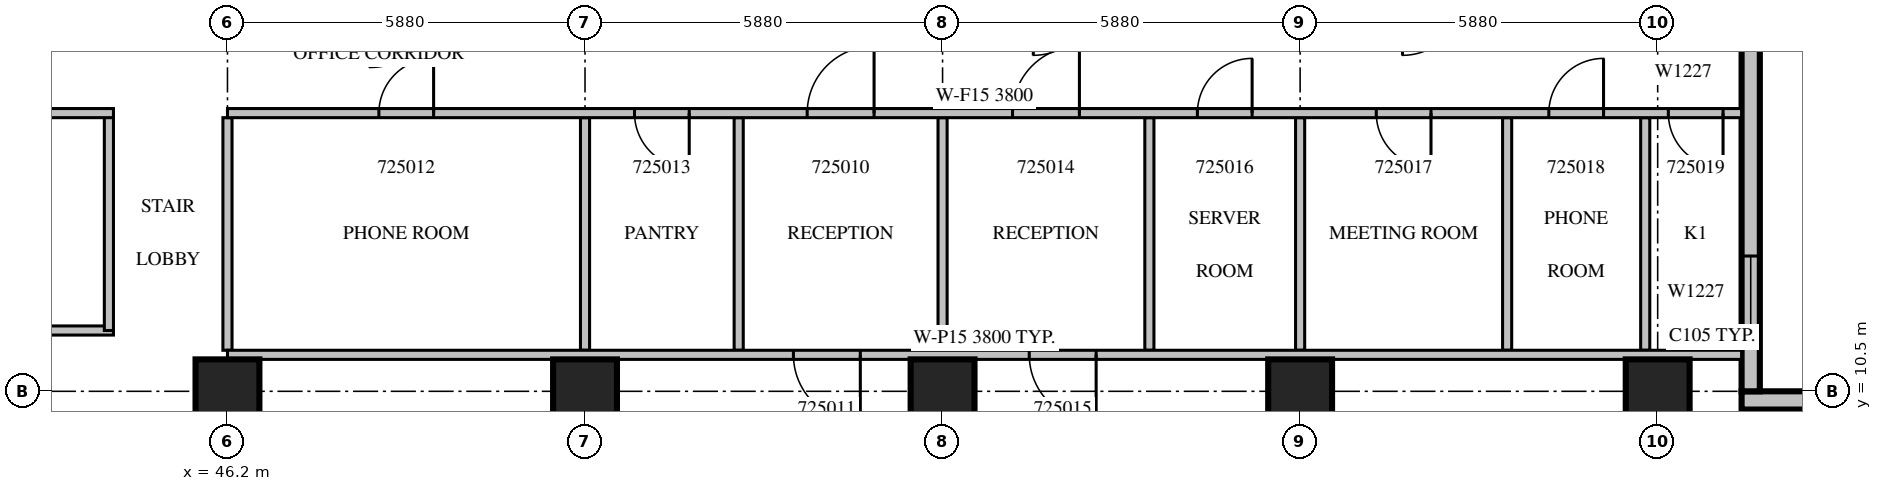
"""IFC4 building model, lengths in metres.
Left out: names, types, materials, properties, quantities, classifications, styles, units other than length and angle.
Written with IfcOpenShell. Run it as: python <this file> out.ifc"""

import sys

from ifc_helpers import new_model, si_unit, direction, frame, frame_2d, origin, origin_2d, place, context, subcontext, project, spatial, rectangle, extrude, source, transform, mapped, element, fill, save


model = new_model("IFC4")
c1 = context("Model", 3, precision=1e-05, world=origin(), true_north=direction((0.0, 1.0)))
c2 = subcontext(c1, "Body", "Model", "MODEL_VIEW")
j1 = project(units=[si_unit("LENGTHUNIT", "METRE"), si_unit("PLANEANGLEUNIT", "RADIAN")], contexts=[c1])
p1 = place(None, origin())
s1 = spatial("IfcSite", under=j1, at=p1, CompositionType="ELEMENT")
p2 = place(p1, origin())
s2 = spatial("IfcBuilding", under=s1, at=p2, CompositionType="ELEMENT")
p3 = place(p2, frame((0.0, 0.0, 116.1)))
s3 = spatial("IfcBuildingStorey", under=s2, at=p3, CompositionType="ELEMENT", Elevation=116.1)
m1 = source(origin(), c2, "Body", "SweptSolid", [
    extrude(rectangle(XDim=1.05, YDim=1.05, at=origin_2d()), origin(), (0.0, 0.0, 1.0), 4.2),
])
for number, where, z_axis, x_axis in (
    (1, (46.2, 10.5, 0.0), (0.0, 0.0, 1.0), (1.0, 0.0, 0.0)),
    (2, (52.08, 10.5, 0.0), (0.0, 0.0, 1.0), (1.0, 0.0, 0.0)),
    (3, (57.96, 10.5, 0.0), (0.0, 0.0, 1.0), (1.0, 0.0, 0.0)),
    (4, (63.84, 10.5, 0.0), (0.0, 0.0, 1.0), (1.0, 0.0, 0.0)),
    (5, (69.72, 10.5, 0.0), (0.0, 0.0, 1.0), (1.0, 0.0, 0.0)),
):
    element("IfcColumn", number, at=place(p3, frame(where, z_axis=z_axis, x_axis=x_axis)), inside=s3, PredefinedType="COLUMN", context=c2, shape_type="MappedRepresentation", body=[
        mapped(m1, transform((0.0, 0.0, 0.0), scale=1.0)),
    ])
m2 = source(origin(), c2, "Body", "SweptSolid", [
    extrude(rectangle(XDim=1.2, YDim=0.3, at=frame_2d((0.6, 0.0))), origin(), (0.0, 0.0, 1.0), 3.8),
])
p4 = place(p3, frame((71.1, 10.35, 0.0), z_axis=(0.0, 0.0, 1.0), x_axis=(1.0, 0.0, 0.0)))
e6 = element("IfcWall", 6, at=p4, inside=s3, PredefinedType="STANDARD", context=c2, shape_type="MappedRepresentation", body=[
    mapped(m2, transform((0.0, 0.0, 0.0), scale=1.0)),
])
m3 = source(origin(), c2, "Body", "SweptSolid", [
    extrude(rectangle(XDim=6.3, YDim=0.3, at=frame_2d((3.15, 0.0))), origin(), (0.0, 0.0, 1.0), 3.8),
])
p5 = place(p3, frame((71.25, 10.5, 0.0), z_axis=(0.0, 0.0, 1.0), x_axis=(0.0, 1.0, 0.0)))
e7 = element("IfcWall", 7, at=p5, inside=s3, PredefinedType="STANDARD", context=c2, shape_type="MappedRepresentation", body=[
    mapped(m3, transform((0.0, 0.0, 0.0), scale=1.0)),
])
m4 = source(origin(), c2, "Body", "SweptSolid", [
    extrude(rectangle(XDim=1.2, YDim=2.7, at=frame_2d((0.6, 1.35))), frame((0.0, 0.16, 0.0), z_axis=(0.0, -1.0, 0.0), x_axis=(1.0, 0.0, 0.0)), (0.0, 0.0, 1.0), 0.32),
])
p6 = place(p5, frame((1.025, 0.0, 0.6)))
e8 = element("IfcOpeningElement", 8, at=p6, cuts=e7, PredefinedType="OPENING", context=c2, shape_type="MappedRepresentation", body=[
    mapped(m4, transform((0.0, 0.0, 0.0), scale=1.0)),
])
m5 = source(origin(), c2, "Body", "SweptSolid", [
    extrude(rectangle(XDim=6.45, YDim=0.15, at=frame_2d((3.225, 0.0))), origin(), (0.0, 0.0, 1.0), 3.3),
])
p7 = place(p3, frame((37.875, 11.5, 0.0), z_axis=(0.0, 0.0, 1.0), x_axis=(1.0, 0.0, 0.0)))
e9 = element("IfcWall", 9, at=p7, inside=s3, PredefinedType="PARTITIONING", context=c2, shape_type="MappedRepresentation", body=[
    mapped(m5, transform((0.0, 0.0, 0.0), scale=1.0)),
])
m6 = source(origin(), c2, "Body", "SweptSolid", [
    extrude(rectangle(XDim=3.575, YDim=0.15, at=frame_2d((1.788, 0.0))), origin(), (0.0, 0.0, 1.0), 3.8),
])
p8 = place(p3, frame((44.25, 11.5, 0.0), z_axis=(0.0, 0.0, 1.0), x_axis=(0.0, 1.0, 0.0)))
e10 = element("IfcWall", 10, at=p8, inside=s3, PredefinedType="PARTITIONING", context=c2, shape_type="MappedRepresentation", body=[
    mapped(m6, transform((0.0, 0.0, 0.0), scale=1.0)),
])
p9 = place(p3, frame((44.325, 15.075, 0.0), z_axis=(0.0, 0.0, 1.0), x_axis=(-1.0, 0.0, 0.0)))
e11 = element("IfcWall", 11, at=p9, inside=s3, PredefinedType="PARTITIONING", context=c2, shape_type="MappedRepresentation", body=[
    mapped(m5, transform((0.0, 0.0, 0.0), scale=1.0)),
])
m7 = source(origin(), c2, "Body", "SweptSolid", [
    extrude(rectangle(XDim=0.9, YDim=2.1, at=frame_2d((0.45, 1.05))), frame((0.0, 0.085, 0.0), z_axis=(0.0, -1.0, 0.0), x_axis=(1.0, 0.0, 0.0)), (0.0, 0.0, 1.0), 0.17),
])
p10 = place(p9, frame((2.812, 0.0, 0.0)))
e12 = element("IfcOpeningElement", 12, at=p10, cuts=e11, PredefinedType="OPENING", context=c2, shape_type="MappedRepresentation", body=[
    mapped(m7, transform((0.0, 0.0, 0.0), scale=1.0)),
])
m8 = source(origin(), c2, "Body", "SweptSolid", [
    extrude(rectangle(XDim=3.825, YDim=0.15, at=frame_2d((1.913, 0.0))), origin(), (0.0, 0.0, 1.0), 3.8),
])
for number, where, z_axis, x_axis in (
    (13, (52.08, 11.175, 0.0), (0.0, 0.0, 1.0), (0.0, 1.0, 0.0)),
    (14, (54.607, 11.175, 0.0), (0.0, 0.0, 1.0), (0.0, 1.0, 0.0)),
    (15, (61.361, 11.175, 0.0), (0.0, 0.0, 1.0), (0.0, 1.0, 0.0)),
    (16, (63.84, 11.175, 0.0), (0.0, 0.0, 1.0), (0.0, 1.0, 0.0)),
    (17, (67.244, 11.175, 0.0), (0.0, 0.0, 1.0), (0.0, 1.0, 0.0)),
    (18, (69.515, 11.175, 0.0), (0.0, 0.0, 1.0), (0.0, 1.0, 0.0)),
    (19, (46.2, 11.175, 0.0), (0.0, 0.0, 1.0), (0.0, 1.0, 0.0)),
    (20, (57.96, 11.175, 0.0), (0.0, 0.0, 1.0), (0.0, 1.0, 0.0)),
):
    element("IfcWall", number, at=place(p3, frame(where, z_axis=z_axis, x_axis=x_axis)), inside=s3, PredefinedType="PARTITIONING", context=c2, shape_type="MappedRepresentation", body=[
        mapped(m8, transform((0.0, 0.0, 0.0), scale=1.0)),
    ])
m9 = source(origin(), c2, "Body", "SweptSolid", [
    extrude(rectangle(XDim=24.9, YDim=0.15, at=frame_2d((12.45, 0.0))), origin(), (0.0, 0.0, 1.0), 3.8),
])
p11 = place(p3, frame((71.1, 11.1, 0.0), z_axis=(0.0, 0.0, 1.0), x_axis=(-1.0, 0.0, 0.0)))
e21 = element("IfcWall", 21, at=p11, inside=s3, PredefinedType="PARTITIONING", context=c2, shape_type="MappedRepresentation", body=[
    mapped(m9, transform((0.0, 0.0, 0.0), scale=1.0)),
])
m10 = source(origin(), c2, "Body", "SweptSolid", [
    extrude(rectangle(XDim=1.1, YDim=2.1, at=frame_2d((0.55, 1.05))), frame((0.0, 0.085, 0.0), z_axis=(0.0, -1.0, 0.0), x_axis=(1.0, 0.0, 0.0)), (0.0, 0.0, 1.0), 0.17),
])
p12 = place(p11, frame((14.493, 0.0, 0.0)))
e22 = element("IfcOpeningElement", 22, at=p12, cuts=e21, PredefinedType="OPENING", context=c2, shape_type="MappedRepresentation", body=[
    mapped(m10, transform((0.0, 0.0, 0.0), scale=1.0)),
])
p13 = place(p11, frame((10.614, 0.0, 0.0)))
e23 = element("IfcOpeningElement", 23, at=p13, cuts=e21, PredefinedType="OPENING", context=c2, shape_type="MappedRepresentation", body=[
    mapped(m10, transform((0.0, 0.0, 0.0), scale=1.0)),
])
p14 = place(p3, frame((71.1, 15.075, 0.0), z_axis=(0.0, 0.0, 1.0), x_axis=(-1.0, 0.0, 0.0)))
e24 = element("IfcWall", 24, at=p14, inside=s3, PredefinedType="PARTITIONING", context=c2, shape_type="MappedRepresentation", body=[
    mapped(m9, transform((0.0, 0.0, 0.0), scale=1.0)),
])
p15 = place(p14, frame((14.266, 0.0, 0.0)))
e25 = element("IfcOpeningElement", 25, at=p15, cuts=e24, PredefinedType="OPENING", context=c2, shape_type="MappedRepresentation", body=[
    mapped(m10, transform((0.0, 0.0, 0.0), scale=1.0)),
])
p16 = place(p14, frame((21.51, 0.0, 0.0)))
e26 = element("IfcOpeningElement", 26, at=p16, cuts=e24, PredefinedType="OPENING", context=c2, shape_type="MappedRepresentation", body=[
    mapped(m7, transform((0.0, 0.0, 0.0), scale=1.0)),
])
p17 = place(p14, frame((17.306, 0.0, 0.0)))
e27 = element("IfcOpeningElement", 27, at=p17, cuts=e24, PredefinedType="OPENING", context=c2, shape_type="MappedRepresentation", body=[
    mapped(m7, transform((0.0, 0.0, 0.0), scale=1.0)),
])
p18 = place(p14, frame((10.889, 0.0, 0.0)))
e28 = element("IfcOpeningElement", 28, at=p18, cuts=e24, PredefinedType="OPENING", context=c2, shape_type="MappedRepresentation", body=[
    mapped(m10, transform((0.0, 0.0, 0.0), scale=1.0)),
])
p19 = place(p14, frame((8.05, 0.0, 0.0)))
e29 = element("IfcOpeningElement", 29, at=p19, cuts=e24, PredefinedType="OPENING", context=c2, shape_type="MappedRepresentation", body=[
    mapped(m7, transform((0.0, 0.0, 0.0), scale=1.0)),
])
p20 = place(p14, frame((5.108, 0.0, 0.0)))
e30 = element("IfcOpeningElement", 30, at=p20, cuts=e24, PredefinedType="OPENING", context=c2, shape_type="MappedRepresentation", body=[
    mapped(m7, transform((0.0, 0.0, 0.0), scale=1.0)),
])
p21 = place(p14, frame((2.27, 0.0, 0.0)))
e31 = element("IfcOpeningElement", 31, at=p21, cuts=e24, PredefinedType="OPENING", context=c2, shape_type="MappedRepresentation", body=[
    mapped(m7, transform((0.0, 0.0, 0.0), scale=1.0)),
])
p22 = place(p14, frame((0.305, 0.0, 0.0)))
e32 = element("IfcOpeningElement", 32, at=p22, cuts=e24, PredefinedType="OPENING", context=c2, shape_type="MappedRepresentation", body=[
    mapped(m7, transform((0.0, 0.0, 0.0), scale=1.0)),
])
m11 = source(origin(), c2, "Body", "SweptSolid", [
    extrude(rectangle(XDim=1.2, YDim=2.7, at=frame_2d((0.6, 1.35))), frame((0.0, 0.03, 0.0), z_axis=(0.0, -1.0, 0.0), x_axis=(1.0, 0.0, 0.0)), (0.0, 0.0, 1.0), 0.06),
])
p23 = place(p6, origin())
e33 = element("IfcWindow", 33, at=p23, inside=s3, PartitioningType="SINGLE_PANEL", PredefinedType="WINDOW", context=c2, shape_type="MappedRepresentation", body=[
    mapped(m11, transform((0.0, 0.0, 0.0), scale=1.0)),
])
fill(e8, e33)
m12 = source(origin(), c2, "Body", "SweptSolid", [
    extrude(rectangle(XDim=1.1, YDim=2.1, at=frame_2d((0.55, 1.05))), frame((0.0, 0.025, 0.0), z_axis=(0.0, -1.0, 0.0), x_axis=(1.0, 0.0, 0.0)), (0.0, 0.0, 1.0), 0.05),
])
p24 = place(p15, origin())
e34 = element("IfcDoor", 34, at=p24, inside=s3, OperationType="SINGLE_SWING_RIGHT", PredefinedType="DOOR", context=c2, shape_type="MappedRepresentation", body=[
    mapped(m12, transform((0.0, 0.0, 0.0), scale=1.0)),
])
fill(e25, e34)
p25 = place(p12, origin())
e35 = element("IfcDoor", 35, at=p25, inside=s3, OperationType="SINGLE_SWING_LEFT", PredefinedType="DOOR", context=c2, shape_type="MappedRepresentation", body=[
    mapped(m12, transform((0.0, 0.0, 0.0), scale=1.0)),
])
fill(e22, e35)
m13 = source(origin(), c2, "Body", "SweptSolid", [
    extrude(rectangle(XDim=0.9, YDim=2.1, at=frame_2d((0.45, 1.05))), frame((0.0, 0.025, 0.0), z_axis=(0.0, -1.0, 0.0), x_axis=(1.0, 0.0, 0.0)), (0.0, 0.0, 1.0), 0.05),
])
p26 = place(p16, origin())
e36 = element("IfcDoor", 36, at=p26, inside=s3, OperationType="SINGLE_SWING_RIGHT", PredefinedType="DOOR", context=c2, shape_type="MappedRepresentation", body=[
    mapped(m13, transform((0.0, 0.0, 0.0), scale=1.0)),
])
fill(e26, e36)
p27 = place(p17, origin())
e37 = element("IfcDoor", 37, at=p27, inside=s3, OperationType="SINGLE_SWING_LEFT", PredefinedType="DOOR", context=c2, shape_type="MappedRepresentation", body=[
    mapped(m13, transform((0.0, 0.0, 0.0), scale=1.0)),
])
fill(e27, e37)
p28 = place(p18, origin())
e38 = element("IfcDoor", 38, at=p28, inside=s3, OperationType="SINGLE_SWING_RIGHT", PredefinedType="DOOR", context=c2, shape_type="MappedRepresentation", body=[
    mapped(m12, transform((0.0, 0.0, 0.0), scale=1.0)),
])
fill(e28, e38)
p29 = place(p13, origin())
e39 = element("IfcDoor", 39, at=p29, inside=s3, OperationType="SINGLE_SWING_LEFT", PredefinedType="DOOR", context=c2, shape_type="MappedRepresentation", body=[
    mapped(m12, transform((0.0, 0.0, 0.0), scale=1.0)),
])
fill(e23, e39)
p30 = place(p19, origin())
e40 = element("IfcDoor", 40, at=p30, inside=s3, OperationType="SINGLE_SWING_RIGHT", PredefinedType="DOOR", context=c2, shape_type="MappedRepresentation", body=[
    mapped(m13, transform((0.0, 0.0, 0.0), scale=1.0)),
])
fill(e29, e40)
p31 = place(p20, origin())
e41 = element("IfcDoor", 41, at=p31, inside=s3, OperationType="SINGLE_SWING_LEFT", PredefinedType="DOOR", context=c2, shape_type="MappedRepresentation", body=[
    mapped(m13, transform((0.0, 0.0, 0.0), scale=1.0)),
])
fill(e30, e41)
p32 = place(p21, origin())
e42 = element("IfcDoor", 42, at=p32, inside=s3, OperationType="SINGLE_SWING_RIGHT", PredefinedType="DOOR", context=c2, shape_type="MappedRepresentation", body=[
    mapped(m13, transform((0.0, 0.0, 0.0), scale=1.0)),
])
fill(e31, e42)
p33 = place(p22, origin())
e43 = element("IfcDoor", 43, at=p33, inside=s3, OperationType="SINGLE_SWING_LEFT", PredefinedType="DOOR", context=c2, shape_type="MappedRepresentation", body=[
    mapped(m13, transform((0.0, 0.0, 0.0), scale=1.0)),
])
fill(e32, e43)
save(model, sys.argv[1])
